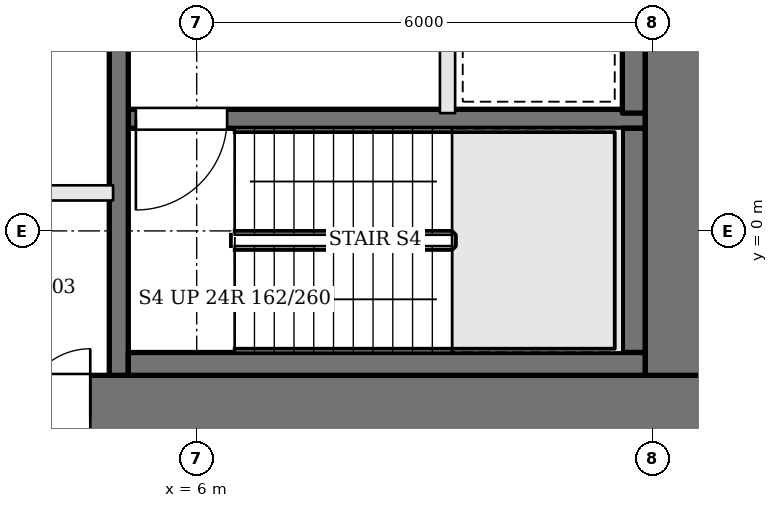
"""IFC4 building model, lengths in metres.
Left out: names, types, materials, properties, quantities, classifications, styles, units other than length and angle.
Written with IfcOpenShell. Run it as: python <this file> out.ifc"""

import sys

from ifc_helpers import new_model, si_unit, direction, frame, frame_2d, origin, place, context, subcontext, project, spatial, rectangle, extrude, element, fill, save


model = new_model("IFC4")
c1 = context("Model", 3, precision=1e-05, world=origin(), true_north=direction((0.0, 1.0)))
c2 = subcontext(c1, "Body", "Model", "MODEL_VIEW")
j1 = project(units=[si_unit("LENGTHUNIT", "METRE"), si_unit("PLANEANGLEUNIT", "RADIAN")], contexts=[c1])
p1 = place(None, origin())
s1 = spatial("IfcSite", under=j1, at=p1, CompositionType="ELEMENT")
p2 = place(p1, origin())
s2 = spatial("IfcBuilding", under=s1, at=p2, CompositionType="ELEMENT")
p3 = place(p2, frame((0.0, 0.0, 161.7)))
s3 = spatial("IfcBuildingStorey", under=s2, at=p3, CompositionType="ELEMENT", Elevation=161.7)
p4 = place(p3, frame((-13.0, -2.45, 0.0), z_axis=(0.0, 0.0, 1.0), x_axis=(1.0, 0.0, 0.0)))
e1 = element("IfcWall", 1, at=p4, inside=s3, PredefinedType="SHEAR", context=c2, shape_type="SweptSolid", body=[
    extrude(rectangle(XDim=26.0, YDim=1.1, at=frame_2d((13.0, 0.0))), origin(), (0.0, 0.0, 1.0), 3.9),
])
p5 = place(p4, frame((9.275, 0.0, 0.0)))
e2 = element("IfcOpeningElement", 2, at=p5, cuts=e1, PredefinedType="OPENING", context=c2, shape_type="SweptSolid", body=[
    extrude(rectangle(XDim=0.9, YDim=2.1, at=frame_2d((0.45, 1.05))), frame((0.0, 0.56, 0.0), z_axis=(0.0, -1.0, 0.0), x_axis=(1.0, 0.0, 0.0)), (0.0, 0.0, 1.0), 1.12),
])
p6 = place(p4, frame((12.525, 0.0, 0.0)))
e3 = element("IfcOpeningElement", 3, at=p6, cuts=e1, PredefinedType="OPENING", context=c2, shape_type="SweptSolid", body=[
    extrude(rectangle(XDim=0.9, YDim=2.1, at=frame_2d((0.45, 1.05))), frame((0.0, 0.56, 0.0), z_axis=(0.0, -1.0, 0.0), x_axis=(1.0, 0.0, 0.0)), (0.0, 0.0, 1.0), 1.12),
])
p7 = place(p4, frame((15.0, 0.0, 0.0)))
e4 = element("IfcOpeningElement", 4, at=p7, cuts=e1, PredefinedType="OPENING", context=c2, shape_type="SweptSolid", body=[
    extrude(rectangle(XDim=1.0, YDim=2.1, at=frame_2d((0.5, 1.05))), frame((0.0, 0.56, 0.0), z_axis=(0.0, -1.0, 0.0), x_axis=(1.0, 0.0, 0.0)), (0.0, 0.0, 1.0), 1.12),
])
p8 = place(p4, frame((16.7, 0.0, 0.0)))
e5 = element("IfcOpeningElement", 5, at=p8, cuts=e1, PredefinedType="OPENING", context=c2, shape_type="SweptSolid", body=[
    extrude(rectangle(XDim=0.9, YDim=2.1, at=frame_2d((0.45, 1.05))), frame((0.0, 0.56, 0.0), z_axis=(0.0, -1.0, 0.0), x_axis=(1.0, 0.0, 0.0)), (0.0, 0.0, 1.0), 1.12),
])
p9 = place(p3, frame((12.45, -1.9, 0.0), z_axis=(0.0, 0.0, 1.0), x_axis=(0.0, 1.0, 0.0)))
e6 = element("IfcWall", 6, at=p9, inside=s3, PredefinedType="SHEAR", context=c2, shape_type="SweptSolid", body=[
    extrude(rectangle(XDim=12.8, YDim=1.1, at=frame_2d((6.4, 0.0))), origin(), (0.0, 0.0, 1.0), 3.9),
])
p10 = place(p9, frame((7.1, 0.0, 0.0)))
e7 = element("IfcOpeningElement", 7, at=p10, cuts=e6, PredefinedType="OPENING", context=c2, shape_type="SweptSolid", body=[
    extrude(rectangle(XDim=1.8, YDim=2.1, at=frame_2d((0.9, 1.05))), frame((0.0, 0.56, 0.0), z_axis=(0.0, -1.0, 0.0), x_axis=(1.0, 0.0, 0.0)), (0.0, 0.0, 1.0), 1.12),
])
p11 = place(p3, frame((11.9, 1.475, 0.0), z_axis=(0.0, 0.0, 1.0), x_axis=(-1.0, 0.0, 0.0)))
e8 = element("IfcWall", 8, at=p11, inside=s3, PredefinedType="SOLIDWALL", context=c2, shape_type="SweptSolid", body=[
    extrude(rectangle(XDim=6.8, YDim=0.25, at=frame_2d((3.4, 0.0))), origin(), (0.0, 0.0, 1.0), 3.7),
])
p12 = place(p11, frame((5.5, 0.0, 0.0)))
e9 = element("IfcOpeningElement", 9, at=p12, cuts=e8, PredefinedType="OPENING", context=c2, shape_type="SweptSolid", body=[
    extrude(rectangle(XDim=1.2, YDim=2.1, at=frame_2d((0.6, 1.05))), frame((0.0, 0.135, 0.0), z_axis=(0.0, -1.0, 0.0), x_axis=(1.0, 0.0, 0.0)), (0.0, 0.0, 1.0), 0.27),
])
p13 = place(p3, frame((9.3, 4.55, 0.0), z_axis=(0.0, 0.0, 1.0), x_axis=(0.0, -1.0, 0.0)))
e10 = element("IfcWall", 10, at=p13, inside=s3, PredefinedType="SOLIDWALL", context=c2, shape_type="SweptSolid", body=[
    extrude(rectangle(XDim=3.0, YDim=0.2, at=frame_2d((1.5, 0.0))), origin(), (0.0, 0.0, 1.0), 3.7),
])
p14 = place(p3, frame((4.975, 10.9, 0.0), z_axis=(0.0, 0.0, 1.0), x_axis=(0.0, -1.0, 0.0)))
e11 = element("IfcWall", 11, at=p14, inside=s3, PredefinedType="SOLIDWALL", context=c2, shape_type="SweptSolid", body=[
    extrude(rectangle(XDim=12.8, YDim=0.25, at=frame_2d((6.4, 0.0))), origin(), (0.0, 0.0, 1.0), 3.7),
])
p15 = place(p14, frame((4.95, 0.0, 0.0)))
e12 = element("IfcOpeningElement", 12, at=p15, cuts=e11, PredefinedType="OPENING", context=c2, shape_type="SweptSolid", body=[
    extrude(rectangle(XDim=1.2, YDim=2.1, at=frame_2d((0.6, 1.05))), frame((0.0, 0.135, 0.0), z_axis=(0.0, -1.0, 0.0), x_axis=(1.0, 0.0, 0.0)), (0.0, 0.0, 1.0), 0.27),
])
p16 = place(p3, frame((11.75, 4.55, 0.0), z_axis=(0.0, 0.0, 1.0), x_axis=(0.0, -1.0, 0.0)))
e13 = element("IfcWall", 13, at=p16, inside=s3, PredefinedType="SOLIDWALL", context=c2, shape_type="SweptSolid", body=[
    extrude(rectangle(XDim=3.0, YDim=0.3, at=frame_2d((1.5, 0.0))), origin(), (0.0, 0.0, 1.0), 3.7),
])
p17 = place(p3, frame((11.75, 1.35, 0.0), z_axis=(0.0, 0.0, 1.0), x_axis=(0.0, -1.0, 0.0)))
e14 = element("IfcWall", 14, at=p17, inside=s3, PredefinedType="SOLIDWALL", context=c2, shape_type="SweptSolid", body=[
    extrude(rectangle(XDim=2.95, YDim=0.3, at=frame_2d((1.475, 0.0))), origin(), (0.0, 0.0, 1.0), 3.7),
])
p18 = place(p3, frame((11.9, -1.75, 0.0), z_axis=(0.0, 0.0, 1.0), x_axis=(-1.0, 0.0, 0.0)))
e15 = element("IfcWall", 15, at=p18, inside=s3, PredefinedType="SOLIDWALL", context=c2, shape_type="SweptSolid", body=[
    extrude(rectangle(XDim=6.8, YDim=0.3, at=frame_2d((3.4, 0.0))), origin(), (0.0, 0.0, 1.0), 3.7),
])
p19 = place(p3, frame((-4.9, 0.5, 0.0), z_axis=(0.0, 0.0, 1.0), x_axis=(1.0, 0.0, 0.0)))
e16 = element("IfcWall", 16, at=p19, inside=s3, PredefinedType="SOLIDWALL", context=c2, shape_type="SweptSolid", body=[
    extrude(rectangle(XDim=9.8, YDim=0.2, at=frame_2d((4.9, 0.0))), origin(), (0.0, 0.0, 1.0), 3.7),
])
p20 = place(p12, origin())
e17 = element("IfcDoor", 17, at=p20, inside=s3, OperationType="SINGLE_SWING_RIGHT", PredefinedType="DOOR", context=c2, shape_type="SweptSolid", body=[
    extrude(rectangle(XDim=1.2, YDim=2.1, at=frame_2d((0.6, 1.05))), frame((0.0, 0.025, 0.0), z_axis=(0.0, -1.0, 0.0), x_axis=(1.0, 0.0, 0.0)), (0.0, 0.0, 1.0), 0.05),
])
fill(e9, e17)
p21 = place(p8, origin())
e18 = element("IfcDoor", 18, at=p21, inside=s3, OperationType="SINGLE_SWING_RIGHT", PredefinedType="DOOR", context=c2, shape_type="SweptSolid", body=[
    extrude(rectangle(XDim=0.9, YDim=2.1, at=frame_2d((0.45, 1.05))), frame((0.0, 0.025, 0.0), z_axis=(0.0, -1.0, 0.0), x_axis=(1.0, 0.0, 0.0)), (0.0, 0.0, 1.0), 0.05),
])
fill(e5, e18)
save(model, sys.argv[1])
